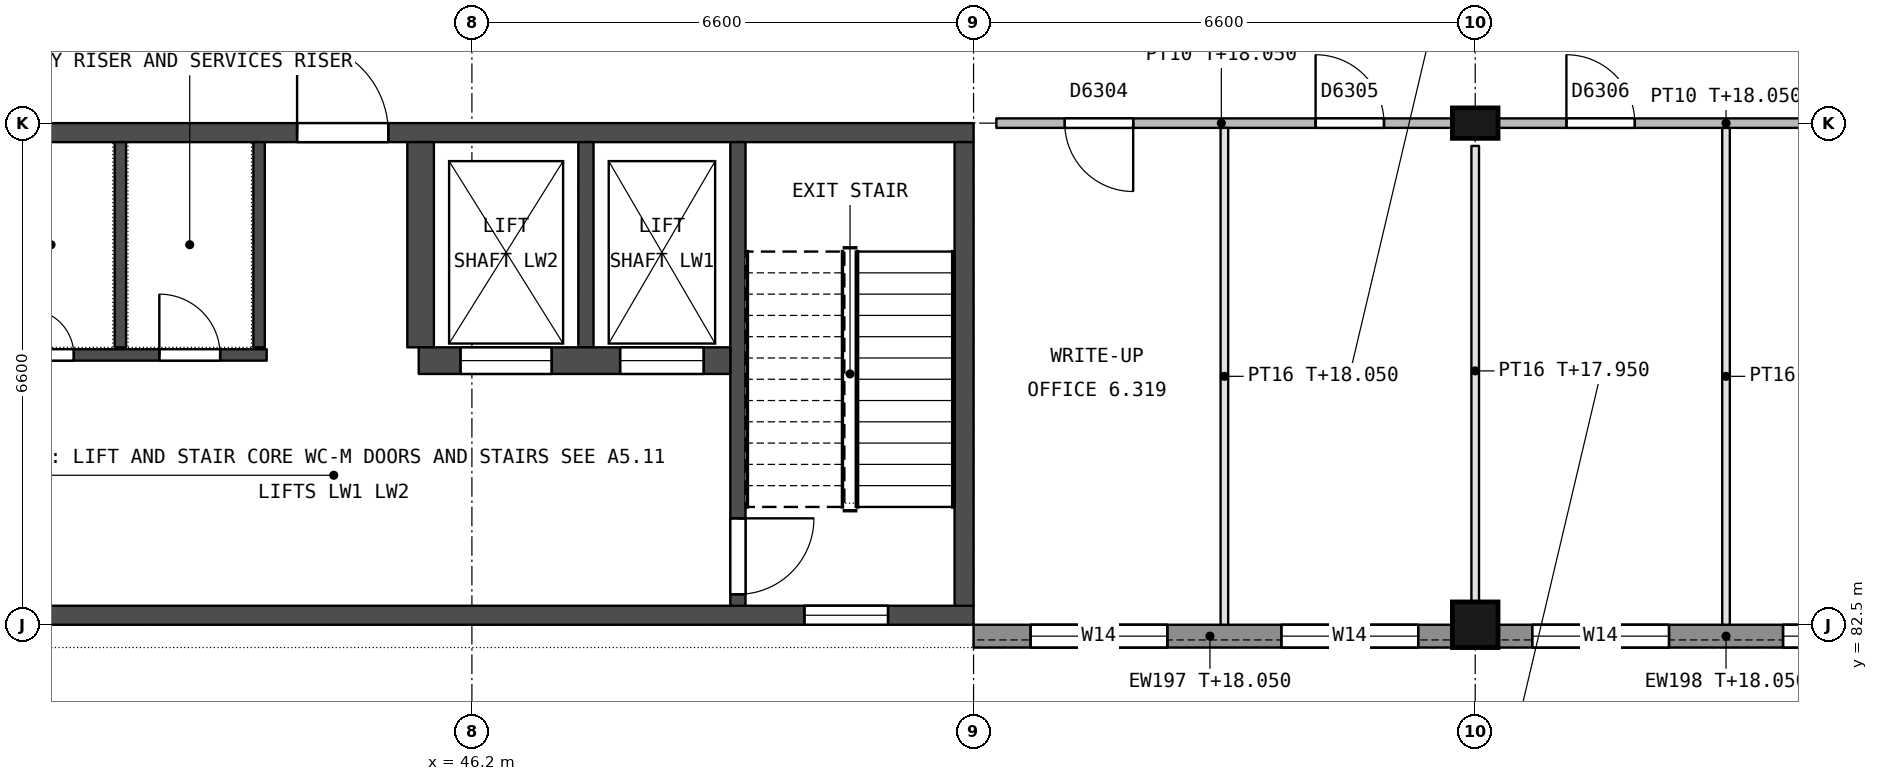
"""IFC4 building model, lengths in metres.
Left out: names, types, materials, properties, quantities, classifications, styles, units other than length and angle.
Written with IfcOpenShell. Run it as: python <this file> out.ifc"""

import sys

from ifc_helpers import new_model, si_unit, direction, frame, frame_2d, origin, origin_2d, place, context, subcontext, project, spatial, rectangle, extrude, element, fill, save


model = new_model("IFC4")
c1 = context("Model", 3, precision=1e-05, world=origin(), true_north=direction((0.0, 1.0)))
c2 = subcontext(c1, "Body", "Model", "MODEL_VIEW")
j1 = project(units=[si_unit("LENGTHUNIT", "METRE"), si_unit("PLANEANGLEUNIT", "RADIAN")], contexts=[c1])
p1 = place(None, origin())
s1 = spatial("IfcSite", under=j1, at=p1, CompositionType="ELEMENT")
p2 = place(p1, origin())
s2 = spatial("IfcBuilding", under=s1, at=p2, CompositionType="ELEMENT")
p3 = place(p2, frame((0.0, 0.0, 14.4)))
s3 = spatial("IfcBuildingStorey", under=s2, at=p3, CompositionType="ELEMENT", Elevation=14.4)
p4 = place(p3, frame((59.4, 82.5, 0.0), z_axis=(0.0, 0.0, 1.0), x_axis=(1.0, 0.0, 0.0)))
e1 = element("IfcColumn", 1, at=p4, inside=s3, PredefinedType="COLUMN", context=c2, shape_type="SweptSolid", body=[
    extrude(rectangle(XDim=0.6, YDim=0.6, at=origin_2d()), origin(), (0.0, 0.0, 1.0), 4.5),
])
p5 = place(p3, frame((59.4, 89.1, 0.0), z_axis=(0.0, 0.0, 1.0), x_axis=(1.0, 0.0, 0.0)))
e2 = element("IfcColumn", 2, at=p5, inside=s3, PredefinedType="COLUMN", context=c2, shape_type="SweptSolid", body=[
    extrude(rectangle(XDim=0.6, YDim=0.4, at=origin_2d()), origin(), (0.0, 0.0, 1.0), 4.5),
])
p6 = place(p3, frame((52.8, 88.975, 0.0), z_axis=(0.0, 0.0, 1.0), x_axis=(-1.0, 0.0, 0.0)))
e3 = element("IfcWall", 3, at=p6, inside=s3, PredefinedType="SHEAR", context=c2, shape_type="SweptSolid", body=[
    extrude(rectangle(XDim=13.2, YDim=0.25, at=frame_2d((6.6, 0.0))), origin(), (0.0, 0.0, 1.0), 4.25),
])
p7 = place(p6, frame((7.7, 0.0, 0.0)))
e4 = element("IfcOpeningElement", 4, at=p7, cuts=e3, PredefinedType="OPENING", context=c2, shape_type="SweptSolid", body=[
    extrude(rectangle(XDim=1.2, YDim=2.1, at=frame_2d((0.6, 1.05))), frame((0.0, 0.135, 0.0), z_axis=(0.0, -1.0, 0.0), x_axis=(1.0, 0.0, 0.0)), (0.0, 0.0, 1.0), 0.27),
])
p8 = place(p3, frame((52.8, 82.625, 0.0), z_axis=(0.0, 0.0, 1.0), x_axis=(-1.0, 0.0, 0.0)))
e5 = element("IfcWall", 5, at=p8, inside=s3, PredefinedType="SHEAR", context=c2, shape_type="SweptSolid", body=[
    extrude(rectangle(XDim=13.2, YDim=0.25, at=frame_2d((6.6, 0.0))), origin(), (0.0, 0.0, 1.0), 4.25),
])
p9 = place(p8, frame((1.125, 0.0, 0.7)))
e6 = element("IfcOpeningElement", 6, at=p9, cuts=e5, PredefinedType="OPENING", context=c2, shape_type="SweptSolid", body=[
    extrude(rectangle(XDim=1.1, YDim=1.5, at=frame_2d((0.55, 0.75))), frame((0.0, 0.135, 0.0), z_axis=(0.0, -1.0, 0.0), x_axis=(1.0, 0.0, 0.0)), (0.0, 0.0, 1.0), 0.27),
])
p10 = place(p3, frame((52.675, 88.85, 0.0), z_axis=(0.0, 0.0, 1.0), x_axis=(0.0, -1.0, 0.0)))
e7 = element("IfcWall", 7, at=p10, inside=s3, PredefinedType="SHEAR", context=c2, shape_type="SweptSolid", body=[
    extrude(rectangle(XDim=6.1, YDim=0.25, at=frame_2d((3.05, 0.0))), origin(), (0.0, 0.0, 1.0), 4.25),
])
p11 = place(p3, frame((49.7, 88.85, 0.0), z_axis=(0.0, 0.0, 1.0), x_axis=(0.0, -1.0, 0.0)))
e8 = element("IfcWall", 8, at=p11, inside=s3, PredefinedType="SHEAR", context=c2, shape_type="SweptSolid", body=[
    extrude(rectangle(XDim=6.1, YDim=0.2, at=frame_2d((3.05, 0.0))), origin(), (0.0, 0.0, 1.0), 4.25),
])
p12 = place(p11, frame((4.95, 0.0, 0.0)))
e9 = element("IfcOpeningElement", 9, at=p12, cuts=e8, PredefinedType="OPENING", context=c2, shape_type="SweptSolid", body=[
    extrude(rectangle(XDim=1.0, YDim=2.2, at=frame_2d((0.5, 1.1))), frame((0.0, 0.11, 0.0), z_axis=(0.0, -1.0, 0.0), x_axis=(1.0, 0.0, 0.0)), (0.0, 0.0, 1.0), 0.22),
])
p13 = place(p3, frame((47.7, 88.85, 0.0), z_axis=(0.0, 0.0, 1.0), x_axis=(0.0, -1.0, 0.0)))
e10 = element("IfcWall", 10, at=p13, inside=s3, PredefinedType="SHEAR", context=c2, shape_type="SweptSolid", body=[
    extrude(rectangle(XDim=2.7, YDim=0.2, at=frame_2d((1.35, 0.0))), origin(), (0.0, 0.0, 1.0), 4.25),
])
p14 = place(p3, frame((45.525, 88.85, 0.0), z_axis=(0.0, 0.0, 1.0), x_axis=(0.0, -1.0, 0.0)))
e11 = element("IfcWall", 11, at=p14, inside=s3, PredefinedType="SHEAR", context=c2, shape_type="SweptSolid", body=[
    extrude(rectangle(XDim=2.7, YDim=0.35, at=frame_2d((1.35, 0.0))), origin(), (0.0, 0.0, 1.0), 4.25),
])
p15 = place(p3, frame((49.6, 85.975, 0.0), z_axis=(0.0, 0.0, 1.0), x_axis=(-1.0, 0.0, 0.0)))
e12 = element("IfcWall", 12, at=p15, inside=s3, PredefinedType="SHEAR", context=c2, shape_type="SweptSolid", body=[
    extrude(rectangle(XDim=4.1, YDim=0.35, at=frame_2d((2.05, 0.0))), origin(), (0.0, 0.0, 1.0), 4.25),
])
p16 = place(p15, frame((0.35, 0.0, 0.0)))
e13 = element("IfcOpeningElement", 13, at=p16, cuts=e12, PredefinedType="OPENING", context=c2, shape_type="SweptSolid", body=[
    extrude(rectangle(XDim=1.1, YDim=2.2, at=frame_2d((0.55, 1.1))), frame((0.0, 0.185, 0.0), z_axis=(0.0, -1.0, 0.0), x_axis=(1.0, 0.0, 0.0)), (0.0, 0.0, 1.0), 0.37),
])
p17 = place(p15, frame((2.35, 0.0, 0.0)))
e14 = element("IfcOpeningElement", 14, at=p17, cuts=e12, PredefinedType="OPENING", context=c2, shape_type="SweptSolid", body=[
    extrude(rectangle(XDim=1.2, YDim=2.3, at=frame_2d((0.6, 1.15))), frame((0.0, 0.185, 0.0), z_axis=(0.0, -1.0, 0.0), x_axis=(1.0, 0.0, 0.0)), (0.0, 0.0, 1.0), 0.37),
])
p18 = place(p3, frame((43.4, 88.85, 0.0), z_axis=(0.0, 0.0, 1.0), x_axis=(0.0, -1.0, 0.0)))
e15 = element("IfcWall", 15, at=p18, inside=s3, PredefinedType="SHEAR", context=c2, shape_type="SweptSolid", body=[
    extrude(rectangle(XDim=2.7, YDim=0.15, at=frame_2d((1.35, 0.0))), origin(), (0.0, 0.0, 1.0), 4.25),
])
p19 = place(p3, frame((43.5, 86.05, 0.0), z_axis=(0.0, 0.0, 1.0), x_axis=(-1.0, 0.0, 0.0)))
e16 = element("IfcWall", 16, at=p19, inside=s3, PredefinedType="SHEAR", context=c2, shape_type="SweptSolid", body=[
    extrude(rectangle(XDim=3.65, YDim=0.15, at=frame_2d((1.825, 0.0))), origin(), (0.0, 0.0, 1.0), 4.25),
])
p20 = place(p19, frame((0.613, 0.0, 0.0)))
e17 = element("IfcOpeningElement", 17, at=p20, cuts=e16, PredefinedType="OPENING", context=c2, shape_type="SweptSolid", body=[
    extrude(rectangle(XDim=0.8, YDim=2.0, at=frame_2d((0.4, 1.0))), frame((0.0, 0.085, 0.0), z_axis=(0.0, -1.0, 0.0), x_axis=(1.0, 0.0, 0.0)), (0.0, 0.0, 1.0), 0.17),
])
p21 = place(p19, frame((2.538, 0.0, 0.0)))
e18 = element("IfcOpeningElement", 18, at=p21, cuts=e16, PredefinedType="OPENING", context=c2, shape_type="SweptSolid", body=[
    extrude(rectangle(XDim=0.6, YDim=2.1, at=frame_2d((0.3, 1.05))), frame((0.0, 0.085, 0.0), z_axis=(0.0, -1.0, 0.0), x_axis=(1.0, 0.0, 0.0)), (0.0, 0.0, 1.0), 0.17),
])
p22 = place(p3, frame((41.575, 88.85, 0.0), z_axis=(0.0, 0.0, 1.0), x_axis=(0.0, -1.0, 0.0)))
e19 = element("IfcWall", 19, at=p22, inside=s3, PredefinedType="SHEAR", context=c2, shape_type="SweptSolid", body=[
    extrude(rectangle(XDim=2.7, YDim=0.15, at=frame_2d((1.35, 0.0))), origin(), (0.0, 0.0, 1.0), 4.25),
])
p23 = place(p3, frame((59.1, 82.35, 0.0), z_axis=(0.0, 0.0, 1.0), x_axis=(-1.0, 0.0, 0.0)))
e20 = element("IfcWall", 20, at=p23, inside=s3, PredefinedType="STANDARD", context=c2, shape_type="SweptSolid", body=[
    extrude(rectangle(XDim=6.3, YDim=0.3, at=frame_2d((3.15, 0.0))), origin(), (0.0, 0.0, 1.0), 3.65),
])
p24 = place(p23, frame((3.75, 0.0, 0.9)))
e21 = element("IfcOpeningElement", 21, at=p24, cuts=e20, PredefinedType="OPENING", context=c2, shape_type="SweptSolid", body=[
    extrude(rectangle(XDim=1.8, YDim=1.5, at=frame_2d((0.9, 0.75))), frame((0.0, 0.16, 0.0), z_axis=(0.0, -1.0, 0.0), x_axis=(1.0, 0.0, 0.0)), (0.0, 0.0, 1.0), 0.32),
])
p25 = place(p23, frame((0.45, 0.0, 0.9)))
e22 = element("IfcOpeningElement", 22, at=p25, cuts=e20, PredefinedType="OPENING", context=c2, shape_type="SweptSolid", body=[
    extrude(rectangle(XDim=1.8, YDim=1.5, at=frame_2d((0.9, 0.75))), frame((0.0, 0.16, 0.0), z_axis=(0.0, -1.0, 0.0), x_axis=(1.0, 0.0, 0.0)), (0.0, 0.0, 1.0), 0.32),
])
p26 = place(p3, frame((65.7, 82.35, 0.0), z_axis=(0.0, 0.0, 1.0), x_axis=(-1.0, 0.0, 0.0)))
e23 = element("IfcWall", 23, at=p26, inside=s3, PredefinedType="STANDARD", context=c2, shape_type="SweptSolid", body=[
    extrude(rectangle(XDim=6.0, YDim=0.3, at=frame_2d((3.0, 0.0))), origin(), (0.0, 0.0, 1.0), 3.65),
])
p27 = place(p26, frame((3.75, 0.0, 0.9)))
e24 = element("IfcOpeningElement", 24, at=p27, cuts=e23, PredefinedType="OPENING", context=c2, shape_type="SweptSolid", body=[
    extrude(rectangle(XDim=1.8, YDim=1.5, at=frame_2d((0.9, 0.75))), frame((0.0, 0.16, 0.0), z_axis=(0.0, -1.0, 0.0), x_axis=(1.0, 0.0, 0.0)), (0.0, 0.0, 1.0), 0.32),
])
p28 = place(p26, frame((0.45, 0.0, 0.9)))
e25 = element("IfcOpeningElement", 25, at=p28, cuts=e23, PredefinedType="OPENING", context=c2, shape_type="SweptSolid", body=[
    extrude(rectangle(XDim=1.8, YDim=1.5, at=frame_2d((0.9, 0.75))), frame((0.0, 0.16, 0.0), z_axis=(0.0, -1.0, 0.0), x_axis=(1.0, 0.0, 0.0)), (0.0, 0.0, 1.0), 0.32),
])
p29 = place(p3, frame((59.1, 89.1, 0.0), z_axis=(0.0, 0.0, 1.0), x_axis=(-1.0, 0.0, 0.0)))
e26 = element("IfcWall", 26, at=p29, inside=s3, PredefinedType="PARTITIONING", context=c2, shape_type="SweptSolid", body=[
    extrude(rectangle(XDim=6.0, YDim=0.125, at=frame_2d((3.0, 0.0))), origin(), (0.0, 0.0, 1.0), 3.65),
])
p30 = place(p29, frame((4.2, 0.0, 0.0)))
e27 = element("IfcOpeningElement", 27, at=p30, cuts=e26, PredefinedType="OPENING", context=c2, shape_type="SweptSolid", body=[
    extrude(rectangle(XDim=0.9, YDim=2.1, at=frame_2d((0.45, 1.05))), frame((0.0, 0.073, 0.0), z_axis=(0.0, -1.0, 0.0), x_axis=(1.0, 0.0, 0.0)), (0.0, 0.0, 1.0), 0.145),
])
p31 = place(p29, frame((0.9, 0.0, 0.0)))
e28 = element("IfcOpeningElement", 28, at=p31, cuts=e26, PredefinedType="OPENING", context=c2, shape_type="SweptSolid", body=[
    extrude(rectangle(XDim=0.9, YDim=2.1, at=frame_2d((0.45, 1.05))), frame((0.0, 0.073, 0.0), z_axis=(0.0, -1.0, 0.0), x_axis=(1.0, 0.0, 0.0)), (0.0, 0.0, 1.0), 0.145),
])
p32 = place(p3, frame((65.7, 89.1, 0.0), z_axis=(0.0, 0.0, 1.0), x_axis=(-1.0, 0.0, 0.0)))
e29 = element("IfcWall", 29, at=p32, inside=s3, PredefinedType="PARTITIONING", context=c2, shape_type="SweptSolid", body=[
    extrude(rectangle(XDim=6.0, YDim=0.125, at=frame_2d((3.0, 0.0))), origin(), (0.0, 0.0, 1.0), 3.65),
])
p33 = place(p32, frame((4.2, 0.0, 0.0)))
e30 = element("IfcOpeningElement", 30, at=p33, cuts=e29, PredefinedType="OPENING", context=c2, shape_type="SweptSolid", body=[
    extrude(rectangle(XDim=0.9, YDim=2.1, at=frame_2d((0.45, 1.05))), frame((0.0, 0.073, 0.0), z_axis=(0.0, -1.0, 0.0), x_axis=(1.0, 0.0, 0.0)), (0.0, 0.0, 1.0), 0.145),
])
p34 = place(p32, frame((0.9, 0.0, 0.0)))
e31 = element("IfcOpeningElement", 31, at=p34, cuts=e29, PredefinedType="OPENING", context=c2, shape_type="SweptSolid", body=[
    extrude(rectangle(XDim=0.9, YDim=2.1, at=frame_2d((0.45, 1.05))), frame((0.0, 0.073, 0.0), z_axis=(0.0, -1.0, 0.0), x_axis=(1.0, 0.0, 0.0)), (0.0, 0.0, 1.0), 0.145),
])
p35 = place(p3, frame((56.1, 82.5, 0.0), z_axis=(0.0, 0.0, 1.0), x_axis=(0.0, 1.0, 0.0)))
e32 = element("IfcWall", 32, at=p35, inside=s3, PredefinedType="PARTITIONING", context=c2, shape_type="SweptSolid", body=[
    extrude(rectangle(XDim=6.537, YDim=0.1, at=frame_2d((3.269, 0.0))), origin(), (0.0, 0.0, 1.0), 3.65),
])
p36 = place(p3, frame((59.4, 82.8, 0.0), z_axis=(0.0, 0.0, 1.0), x_axis=(0.0, 1.0, 0.0)))
e33 = element("IfcWall", 33, at=p36, inside=s3, PredefinedType="PARTITIONING", context=c2, shape_type="SweptSolid", body=[
    extrude(rectangle(XDim=6.0, YDim=0.1, at=frame_2d((3.0, 0.0))), origin(), (0.0, 0.0, 1.0), 3.55),
])
p37 = place(p3, frame((62.7, 82.5, 0.0), z_axis=(0.0, 0.0, 1.0), x_axis=(0.0, 1.0, 0.0)))
e34 = element("IfcWall", 34, at=p37, inside=s3, PredefinedType="PARTITIONING", context=c2, shape_type="SweptSolid", body=[
    extrude(rectangle(XDim=6.537, YDim=0.1, at=frame_2d((3.269, 0.0))), origin(), (0.0, 0.0, 1.0), 3.65),
])
p38 = place(p7, origin())
e35 = element("IfcDoor", 35, at=p38, inside=s3, OperationType="SINGLE_SWING_RIGHT", PredefinedType="DOOR", context=c2, shape_type="SweptSolid", body=[
    extrude(rectangle(XDim=1.2, YDim=2.1, at=frame_2d((0.6, 1.05))), frame((0.0, 0.025, 0.0), z_axis=(0.0, -1.0, 0.0), x_axis=(1.0, 0.0, 0.0)), (0.0, 0.0, 1.0), 0.05),
])
fill(e4, e35)
p39 = place(p20, origin())
e36 = element("IfcDoor", 36, at=p39, inside=s3, OperationType="SINGLE_SWING_RIGHT", PredefinedType="DOOR", context=c2, shape_type="SweptSolid", body=[
    extrude(rectangle(XDim=0.8, YDim=2.0, at=frame_2d((0.4, 1.0))), frame((0.0, 0.025, 0.0), z_axis=(0.0, -1.0, 0.0), x_axis=(1.0, 0.0, 0.0)), (0.0, 0.0, 1.0), 0.05),
])
fill(e17, e36)
p40 = place(p21, origin())
e37 = element("IfcDoor", 37, at=p40, inside=s3, OperationType="SINGLE_SWING_RIGHT", PredefinedType="DOOR", context=c2, shape_type="SweptSolid", body=[
    extrude(rectangle(XDim=0.6, YDim=2.1, at=frame_2d((0.3, 1.05))), frame((0.0, 0.025, 0.0), z_axis=(0.0, -1.0, 0.0), x_axis=(1.0, 0.0, 0.0)), (0.0, 0.0, 1.0), 0.05),
])
fill(e18, e37)
p41 = place(p12, origin())
e38 = element("IfcDoor", 38, at=p41, inside=s3, OperationType="SINGLE_SWING_LEFT", PredefinedType="DOOR", context=c2, shape_type="SweptSolid", body=[
    extrude(rectangle(XDim=1.0, YDim=2.2, at=frame_2d((0.5, 1.1))), frame((0.0, 0.025, 0.0), z_axis=(0.0, -1.0, 0.0), x_axis=(1.0, 0.0, 0.0)), (0.0, 0.0, 1.0), 0.05),
])
fill(e9, e38)
p42 = place(p16, origin())
e39 = element("IfcDoor", 39, at=p42, inside=s3, OperationType="DOUBLE_DOOR_SLIDING", PredefinedType="NOTDEFINED", context=c2, shape_type="SweptSolid", body=[
    extrude(rectangle(XDim=1.1, YDim=2.2, at=frame_2d((0.55, 1.1))), frame((0.0, 0.025, 0.0), z_axis=(0.0, -1.0, 0.0), x_axis=(1.0, 0.0, 0.0)), (0.0, 0.0, 1.0), 0.05),
])
fill(e13, e39)
p43 = place(p17, origin())
e40 = element("IfcDoor", 40, at=p43, inside=s3, OperationType="DOUBLE_DOOR_SLIDING", PredefinedType="NOTDEFINED", context=c2, shape_type="SweptSolid", body=[
    extrude(rectangle(XDim=1.2, YDim=2.3, at=frame_2d((0.6, 1.15))), frame((0.0, 0.025, 0.0), z_axis=(0.0, -1.0, 0.0), x_axis=(1.0, 0.0, 0.0)), (0.0, 0.0, 1.0), 0.05),
])
fill(e14, e40)
p44 = place(p9, origin())
e41 = element("IfcWindow", 41, at=p44, inside=s3, PartitioningType="SINGLE_PANEL", PredefinedType="WINDOW", context=c2, shape_type="SweptSolid", body=[
    extrude(rectangle(XDim=1.1, YDim=1.5, at=frame_2d((0.55, 0.75))), frame((0.0, 0.03, 0.0), z_axis=(0.0, -1.0, 0.0), x_axis=(1.0, 0.0, 0.0)), (0.0, 0.0, 1.0), 0.06),
])
fill(e6, e41)
p45 = place(p24, origin())
e42 = element("IfcWindow", 42, at=p45, inside=s3, PartitioningType="SINGLE_PANEL", PredefinedType="WINDOW", context=c2, shape_type="SweptSolid", body=[
    extrude(rectangle(XDim=1.8, YDim=1.5, at=frame_2d((0.9, 0.75))), frame((0.0, 0.03, 0.0), z_axis=(0.0, -1.0, 0.0), x_axis=(1.0, 0.0, 0.0)), (0.0, 0.0, 1.0), 0.06),
])
fill(e21, e42)
p46 = place(p25, origin())
e43 = element("IfcWindow", 43, at=p46, inside=s3, PartitioningType="SINGLE_PANEL", PredefinedType="WINDOW", context=c2, shape_type="SweptSolid", body=[
    extrude(rectangle(XDim=1.8, YDim=1.5, at=frame_2d((0.9, 0.75))), frame((0.0, 0.03, 0.0), z_axis=(0.0, -1.0, 0.0), x_axis=(1.0, 0.0, 0.0)), (0.0, 0.0, 1.0), 0.06),
])
fill(e22, e43)
p47 = place(p27, origin())
e44 = element("IfcWindow", 44, at=p47, inside=s3, PartitioningType="SINGLE_PANEL", PredefinedType="WINDOW", context=c2, shape_type="SweptSolid", body=[
    extrude(rectangle(XDim=1.8, YDim=1.5, at=frame_2d((0.9, 0.75))), frame((0.0, 0.03, 0.0), z_axis=(0.0, -1.0, 0.0), x_axis=(1.0, 0.0, 0.0)), (0.0, 0.0, 1.0), 0.06),
])
fill(e24, e44)
p48 = place(p28, origin())
e45 = element("IfcWindow", 45, at=p48, inside=s3, PartitioningType="SINGLE_PANEL", PredefinedType="WINDOW", context=c2, shape_type="SweptSolid", body=[
    extrude(rectangle(XDim=1.8, YDim=1.5, at=frame_2d((0.9, 0.75))), frame((0.0, 0.03, 0.0), z_axis=(0.0, -1.0, 0.0), x_axis=(1.0, 0.0, 0.0)), (0.0, 0.0, 1.0), 0.06),
])
fill(e25, e45)
p49 = place(p30, origin())
e46 = element("IfcDoor", 46, at=p49, inside=s3, OperationType="SINGLE_SWING_LEFT", PredefinedType="DOOR", context=c2, shape_type="SweptSolid", body=[
    extrude(rectangle(XDim=0.9, YDim=2.1, at=frame_2d((0.45, 1.05))), frame((0.0, 0.025, 0.0), z_axis=(0.0, -1.0, 0.0), x_axis=(1.0, 0.0, 0.0)), (0.0, 0.0, 1.0), 0.05),
])
fill(e27, e46)
p50 = place(p31, origin())
e47 = element("IfcDoor", 47, at=p50, inside=s3, OperationType="SINGLE_SWING_RIGHT", PredefinedType="DOOR", context=c2, shape_type="SweptSolid", body=[
    extrude(rectangle(XDim=0.9, YDim=2.1, at=frame_2d((0.45, 1.05))), frame((0.0, 0.025, 0.0), z_axis=(0.0, -1.0, 0.0), x_axis=(1.0, 0.0, 0.0)), (0.0, 0.0, 1.0), 0.05),
])
fill(e28, e47)
p51 = place(p33, origin())
e48 = element("IfcDoor", 48, at=p51, inside=s3, OperationType="SINGLE_SWING_RIGHT", PredefinedType="DOOR", context=c2, shape_type="SweptSolid", body=[
    extrude(rectangle(XDim=0.9, YDim=2.1, at=frame_2d((0.45, 1.05))), frame((0.0, 0.025, 0.0), z_axis=(0.0, -1.0, 0.0), x_axis=(1.0, 0.0, 0.0)), (0.0, 0.0, 1.0), 0.05),
])
fill(e30, e48)
save(model, sys.argv[1])
